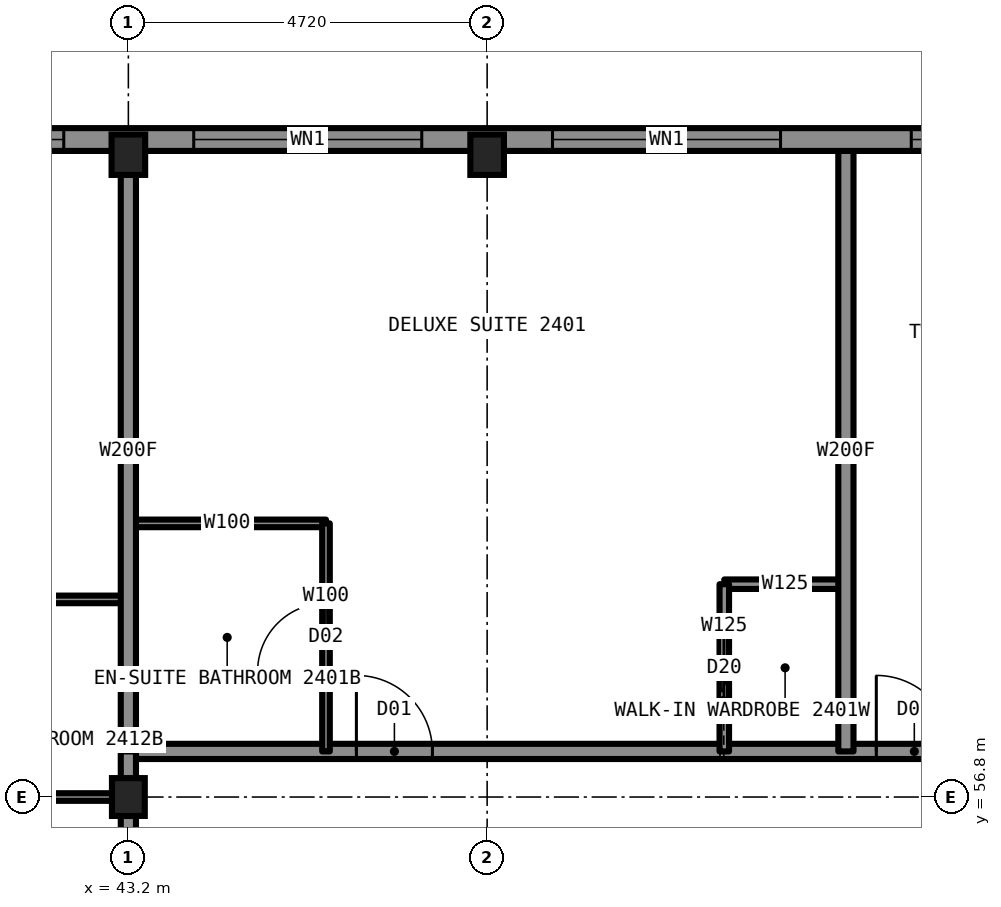
"""IFC4 building model, lengths in metres.
Left out: names, types, materials, properties, quantities, classifications, styles, units other than length and angle.
Written with IfcOpenShell. Run it as: python <this file> out.ifc"""

import sys

from ifc_helpers import new_model, si_unit, direction, frame, frame_2d, origin, origin_2d, place, context, subcontext, project, spatial, rectangle, i_section, extrude, element, fill, save


model = new_model("IFC4")
c1 = context("Model", 3, precision=1e-05, world=origin(), true_north=direction((0.0, 1.0)))
c2 = subcontext(c1, "Body", "Model", "MODEL_VIEW")
j1 = project(units=[si_unit("LENGTHUNIT", "METRE"), si_unit("PLANEANGLEUNIT", "RADIAN")], contexts=[c1])
p1 = place(None, origin())
s1 = spatial("IfcSite", under=j1, at=p1, CompositionType="ELEMENT")
p2 = place(p1, origin())
s2 = spatial("IfcBuilding", under=s1, at=p2, CompositionType="ELEMENT")
p3 = place(p2, frame((0.0, 0.0, 93.4)))
s3 = spatial("IfcBuildingStorey", under=s2, at=p3, CompositionType="ELEMENT", Elevation=93.4)
for number, where, z_axis, x_axis in (
    (1, (43.2, 65.25, 0.0), (0.0, 0.0, 1.0), (1.0, 0.0, 0.0)),
    (2, (47.92, 65.25, 0.0), (0.0, 0.0, 1.0), (1.0, 0.0, 0.0)),
):
    element("IfcColumn", number, at=place(p3, frame(where, z_axis=z_axis, x_axis=x_axis)), inside=s3, PredefinedType="COLUMN", context=c2, shape_type="SweptSolid", body=[
        extrude(i_section(OverallWidth=0.442, OverallDepth=0.531, WebThickness=0.066, FlangeThickness=0.106, at=origin_2d()), origin(), (0.0, 0.0, 1.0), 3.5),
    ])
p4 = place(p3, frame((43.2, 56.8, 0.0), z_axis=(0.0, 0.0, 1.0), x_axis=(1.0, 0.0, 0.0)))
e3 = element("IfcColumn", 3, at=p4, inside=s3, PredefinedType="COLUMN", context=c2, shape_type="SweptSolid", body=[
    extrude(i_section(OverallWidth=0.432, OverallDepth=0.498, WebThickness=0.056, FlangeThickness=0.089, at=origin_2d()), origin(), (0.0, 0.0, 1.0), 3.5),
])
p5 = place(p3, frame((40.6, 56.8, 0.0), z_axis=(0.0, 0.0, 1.0), x_axis=(1.0, 0.0, 0.0)))
e4 = element("IfcWall", 4, at=p5, inside=s3, PredefinedType="PARTITIONING", context=c2, shape_type="SweptSolid", body=[
    extrude(rectangle(XDim=2.6, YDim=0.1, at=frame_2d((1.3, 0.0))), origin(), (0.0, 0.0, 1.0), 2.573),
])
p6 = place(p3, frame((43.2, 57.4, 0.0), z_axis=(0.0, 0.0, 1.0), x_axis=(1.0, 0.0, 0.0)))
e5 = element("IfcWall", 5, at=p6, inside=s3, PredefinedType="PARTITIONING", context=c2, shape_type="SweptSolid", body=[
    extrude(rectangle(XDim=23.6, YDim=0.2, at=frame_2d((11.8, 0.0))), origin(), (0.0, 0.0, 1.0), 3.33),
])
p7 = place(p6, frame((3.0, 0.0, 0.0)))
e6 = element("IfcOpeningElement", 6, at=p7, cuts=e5, PredefinedType="OPENING", context=c2, shape_type="SweptSolid", body=[
    extrude(rectangle(XDim=1.0, YDim=2.2, at=frame_2d((0.5, 1.1))), frame((0.0, 0.11, 0.0), z_axis=(0.0, -1.0, 0.0), x_axis=(1.0, 0.0, 0.0)), (0.0, 0.0, 1.0), 0.22),
])
p8 = place(p6, frame((9.84, 0.0, 0.0)))
e7 = element("IfcOpeningElement", 7, at=p8, cuts=e5, PredefinedType="OPENING", context=c2, shape_type="SweptSolid", body=[
    extrude(rectangle(XDim=1.0, YDim=2.2, at=frame_2d((0.5, 1.1))), frame((0.0, 0.11, 0.0), z_axis=(0.0, -1.0, 0.0), x_axis=(1.0, 0.0, 0.0)), (0.0, 0.0, 1.0), 0.22),
])
p9 = place(p6, frame((16.71, 0.0, 0.0)))
e8 = element("IfcOpeningElement", 8, at=p9, cuts=e5, PredefinedType="OPENING", context=c2, shape_type="SweptSolid", body=[
    extrude(rectangle(XDim=1.0, YDim=2.2, at=frame_2d((0.5, 1.1))), frame((0.0, 0.11, 0.0), z_axis=(0.0, -1.0, 0.0), x_axis=(1.0, 0.0, 0.0)), (0.0, 0.0, 1.0), 0.22),
])
p10 = place(p6, frame((19.28, 0.0, 0.0)))
e9 = element("IfcOpeningElement", 9, at=p10, cuts=e5, PredefinedType="OPENING", context=c2, shape_type="SweptSolid", body=[
    extrude(rectangle(XDim=1.0, YDim=2.2, at=frame_2d((0.5, 1.1))), frame((0.0, 0.11, 0.0), z_axis=(0.0, -1.0, 0.0), x_axis=(1.0, 0.0, 0.0)), (0.0, 0.0, 1.0), 0.22),
])
p11 = place(p3, frame((40.6, 59.4, 0.0), z_axis=(0.0, 0.0, 1.0), x_axis=(1.0, 0.0, 0.0)))
e10 = element("IfcWall", 10, at=p11, inside=s3, PredefinedType="PARTITIONING", context=c2, shape_type="SweptSolid", body=[
    extrude(rectangle(XDim=2.6, YDim=0.1, at=frame_2d((1.3, 0.0))), origin(), (0.0, 0.0, 1.0), 3.33),
])
p12 = place(p3, frame((51.04, 59.6, 0.0), z_axis=(0.0, 0.0, 1.0), x_axis=(1.0, 0.0, 0.0)))
e11 = element("IfcWall", 11, at=p12, inside=s3, PredefinedType="PARTITIONING", context=c2, shape_type="SweptSolid", body=[
    extrude(rectangle(XDim=1.6, YDim=0.125, at=frame_2d((0.8, 0.0))), origin(), (0.0, 0.0, 1.0), 3.33),
])
p13 = place(p3, frame((43.2, 60.4, 0.0), z_axis=(0.0, 0.0, 1.0), x_axis=(1.0, 0.0, 0.0)))
e12 = element("IfcWall", 12, at=p13, inside=s3, PredefinedType="PARTITIONING", context=c2, shape_type="SweptSolid", body=[
    extrude(rectangle(XDim=2.6, YDim=0.1, at=frame_2d((1.3, 0.0))), origin(), (0.0, 0.0, 1.0), 3.33),
])
p14 = place(p3, frame((43.2, 33.22, 0.0), z_axis=(0.0, 0.0, 1.0), x_axis=(0.0, 1.0, 0.0)))
e13 = element("IfcWall", 13, at=p14, inside=s3, PredefinedType="PARTITIONING", context=c2, shape_type="SweptSolid", body=[
    extrude(rectangle(XDim=23.56, YDim=0.2, at=frame_2d((11.78, 0.0))), origin(), (0.0, 0.0, 1.0), 3.33),
])
p15 = place(p14, frame((16.4, 0.0, 0.0)))
e14 = element("IfcOpeningElement", 14, at=p15, cuts=e13, PredefinedType="OPENING", context=c2, shape_type="SweptSolid", body=[
    extrude(rectangle(XDim=1.0, YDim=2.2, at=frame_2d((0.5, 1.1))), frame((0.0, 0.11, 0.0), z_axis=(0.0, -1.0, 0.0), x_axis=(1.0, 0.0, 0.0)), (0.0, 0.0, 1.0), 0.22),
])
p16 = place(p14, frame((21.83, 0.0, 0.0)))
e15 = element("IfcOpeningElement", 15, at=p16, cuts=e13, PredefinedType="OPENING", context=c2, shape_type="SweptSolid", body=[
    extrude(rectangle(XDim=1.1, YDim=2.2, at=frame_2d((0.55, 1.1))), frame((0.0, 0.11, 0.0), z_axis=(0.0, -1.0, 0.0), x_axis=(1.0, 0.0, 0.0)), (0.0, 0.0, 1.0), 0.22),
])
p17 = place(p14, frame((0.63, 0.0, 0.0)))
e16 = element("IfcOpeningElement", 16, at=p17, cuts=e13, PredefinedType="OPENING", context=c2, shape_type="SweptSolid", body=[
    extrude(rectangle(XDim=1.1, YDim=2.2, at=frame_2d((0.55, 1.1))), frame((0.0, 0.11, 0.0), z_axis=(0.0, -1.0, 0.0), x_axis=(1.0, 0.0, 0.0)), (0.0, 0.0, 1.0), 0.22),
])
p18 = place(p14, frame((7.45, 0.0, 0.0)))
e17 = element("IfcOpeningElement", 17, at=p18, cuts=e13, PredefinedType="OPENING", context=c2, shape_type="SweptSolid", body=[
    extrude(rectangle(XDim=2.0, YDim=2.4, at=frame_2d((1.0, 1.2))), frame((0.0, 0.11, 0.0), z_axis=(0.0, -1.0, 0.0), x_axis=(1.0, 0.0, 0.0)), (0.0, 0.0, 1.0), 0.22),
])
p19 = place(p14, frame((5.4, 0.0, 0.0)))
e18 = element("IfcOpeningElement", 18, at=p19, cuts=e13, PredefinedType="OPENING", context=c2, shape_type="SweptSolid", body=[
    extrude(rectangle(XDim=1.0, YDim=2.1, at=frame_2d((0.5, 1.05))), frame((0.0, 0.11, 0.0), z_axis=(0.0, -1.0, 0.0), x_axis=(1.0, 0.0, 0.0)), (0.0, 0.0, 1.0), 0.22),
])
p20 = place(p3, frame((43.2, 57.4, 0.0), z_axis=(0.0, 0.0, 1.0), x_axis=(0.0, 1.0, 0.0)))
e19 = element("IfcWall", 19, at=p20, inside=s3, PredefinedType="PARTITIONING", context=c2, shape_type="SweptSolid", body=[
    extrude(rectangle(XDim=7.9, YDim=0.2, at=frame_2d((3.95, 0.0))), origin(), (0.0, 0.0, 1.0), 2.573),
])
p21 = place(p3, frame((52.64, 57.4, 0.0), z_axis=(0.0, 0.0, 1.0), x_axis=(0.0, 1.0, 0.0)))
e20 = element("IfcWall", 20, at=p21, inside=s3, PredefinedType="PARTITIONING", context=c2, shape_type="SweptSolid", body=[
    extrude(rectangle(XDim=7.9, YDim=0.2, at=frame_2d((3.95, 0.0))), origin(), (0.0, 0.0, 1.0), 3.33),
])
p22 = place(p3, frame((51.04, 57.4, 0.0), z_axis=(0.0, 0.0, 1.0), x_axis=(0.0, 1.0, 0.0)))
e21 = element("IfcWall", 21, at=p22, inside=s3, PredefinedType="PARTITIONING", context=c2, shape_type="SweptSolid", body=[
    extrude(rectangle(XDim=2.2, YDim=0.125, at=frame_2d((1.1, 0.0))), origin(), (0.0, 0.0, 1.0), 3.33),
])
p23 = place(p22, frame((0.7, 0.0, 0.0)))
e22 = element("IfcOpeningElement", 22, at=p23, cuts=e21, PredefinedType="OPENING", context=c2, shape_type="SweptSolid", body=[
    extrude(rectangle(XDim=0.8, YDim=2.1, at=frame_2d((0.4, 1.05))), frame((0.0, 0.073, 0.0), z_axis=(0.0, -1.0, 0.0), x_axis=(1.0, 0.0, 0.0)), (0.0, 0.0, 1.0), 0.145),
])
p24 = place(p3, frame((45.8, 57.4, 0.0), z_axis=(0.0, 0.0, 1.0), x_axis=(0.0, 1.0, 0.0)))
e23 = element("IfcWall", 23, at=p24, inside=s3, PredefinedType="PARTITIONING", context=c2, shape_type="SweptSolid", body=[
    extrude(rectangle(XDim=3.0, YDim=0.1, at=frame_2d((1.5, 0.0))), origin(), (0.0, 0.0, 1.0), 3.33),
])
p25 = place(p24, frame((1.05, 0.0, 0.0)))
e24 = element("IfcOpeningElement", 24, at=p25, cuts=e23, PredefinedType="OPENING", context=c2, shape_type="SweptSolid", body=[
    extrude(rectangle(XDim=0.9, YDim=2.1, at=frame_2d((0.45, 1.05))), frame((0.0, 0.06, 0.0), z_axis=(0.0, -1.0, 0.0), x_axis=(1.0, 0.0, 0.0)), (0.0, 0.0, 1.0), 0.12),
])
p26 = place(p3, frame((70.1, 65.45, 0.0), z_axis=(0.0, 0.0, 1.0), x_axis=(-1.0, 0.0, 0.0)))
e25 = element("IfcWall", 25, at=p26, inside=s3, PredefinedType="SOLIDWALL", context=c2, shape_type="SweptSolid", body=[
    extrude(rectangle(XDim=30.2, YDim=0.3, at=frame_2d((15.1, 0.0))), origin(), (0.0, 0.0, 1.0), 2.83),
])
p27 = place(p26, frame((0.85, 0.0, 0.5)))
e26 = element("IfcOpeningElement", 26, at=p27, cuts=e25, PredefinedType="OPENING", context=c2, shape_type="SweptSolid", body=[
    extrude(rectangle(XDim=1.6, YDim=2.0, at=frame_2d((0.8, 1.0))), frame((0.0, 0.16, 0.0), z_axis=(0.0, -1.0, 0.0), x_axis=(1.0, 0.0, 0.0)), (0.0, 0.0, 1.0), 0.32),
])
p28 = place(p26, frame((4.16, 0.0, 0.5)))
e27 = element("IfcOpeningElement", 27, at=p28, cuts=e25, PredefinedType="OPENING", context=c2, shape_type="SweptSolid", body=[
    extrude(rectangle(XDim=3.0, YDim=2.0, at=frame_2d((1.5, 1.0))), frame((0.0, 0.16, 0.0), z_axis=(0.0, -1.0, 0.0), x_axis=(1.0, 0.0, 0.0)), (0.0, 0.0, 1.0), 0.32),
])
p29 = place(p26, frame((8.88, 0.0, 0.5)))
e28 = element("IfcOpeningElement", 28, at=p29, cuts=e25, PredefinedType="OPENING", context=c2, shape_type="SweptSolid", body=[
    extrude(rectangle(XDim=3.0, YDim=2.0, at=frame_2d((1.5, 1.0))), frame((0.0, 0.16, 0.0), z_axis=(0.0, -1.0, 0.0), x_axis=(1.0, 0.0, 0.0)), (0.0, 0.0, 1.0), 0.32),
])
p30 = place(p26, frame((13.6, 0.0, 0.5)))
e29 = element("IfcOpeningElement", 29, at=p30, cuts=e25, PredefinedType="OPENING", context=c2, shape_type="SweptSolid", body=[
    extrude(rectangle(XDim=3.0, YDim=2.0, at=frame_2d((1.5, 1.0))), frame((0.0, 0.16, 0.0), z_axis=(0.0, -1.0, 0.0), x_axis=(1.0, 0.0, 0.0)), (0.0, 0.0, 1.0), 0.32),
])
p31 = place(p26, frame((18.32, 0.0, 0.5)))
e30 = element("IfcOpeningElement", 30, at=p31, cuts=e25, PredefinedType="OPENING", context=c2, shape_type="SweptSolid", body=[
    extrude(rectangle(XDim=3.0, YDim=2.0, at=frame_2d((1.5, 1.0))), frame((0.0, 0.16, 0.0), z_axis=(0.0, -1.0, 0.0), x_axis=(1.0, 0.0, 0.0)), (0.0, 0.0, 1.0), 0.32),
])
p32 = place(p26, frame((23.04, 0.0, 0.5)))
e31 = element("IfcOpeningElement", 31, at=p32, cuts=e25, PredefinedType="OPENING", context=c2, shape_type="SweptSolid", body=[
    extrude(rectangle(XDim=3.0, YDim=2.0, at=frame_2d((1.5, 1.0))), frame((0.0, 0.16, 0.0), z_axis=(0.0, -1.0, 0.0), x_axis=(1.0, 0.0, 0.0)), (0.0, 0.0, 1.0), 0.32),
])
p33 = place(p26, frame((27.75, 0.0, 0.5)))
e32 = element("IfcOpeningElement", 32, at=p33, cuts=e25, PredefinedType="OPENING", context=c2, shape_type="SweptSolid", body=[
    extrude(rectangle(XDim=1.6, YDim=2.0, at=frame_2d((0.8, 1.0))), frame((0.0, 0.16, 0.0), z_axis=(0.0, -1.0, 0.0), x_axis=(1.0, 0.0, 0.0)), (0.0, 0.0, 1.0), 0.32),
])
p34 = place(p3, frame((43.2, 56.78, 0.0), z_axis=(0.0, 0.0, 1.0), x_axis=(0.0, 1.0, 0.0)))
e33 = element("IfcWall", 33, at=p34, inside=s3, PredefinedType="PARTITIONING", context=c2, shape_type="SweptSolid", body=[
    extrude(rectangle(XDim=0.62, YDim=0.2, at=frame_2d((0.31, 0.0))), origin(), (0.0, 0.0, 1.0), 2.573),
])
p35 = place(p7, origin())
e34 = element("IfcDoor", 34, at=p35, inside=s3, OperationType="SINGLE_SWING_LEFT", PredefinedType="DOOR", context=c2, shape_type="SweptSolid", body=[
    extrude(rectangle(XDim=1.0, YDim=2.2, at=frame_2d((0.5, 1.1))), frame((0.0, 0.025, 0.0), z_axis=(0.0, -1.0, 0.0), x_axis=(1.0, 0.0, 0.0)), (0.0, 0.0, 1.0), 0.05),
])
fill(e6, e34)
p36 = place(p25, origin())
e35 = element("IfcDoor", 35, at=p36, inside=s3, OperationType="SINGLE_SWING_RIGHT", PredefinedType="DOOR", context=c2, shape_type="SweptSolid", body=[
    extrude(rectangle(XDim=0.9, YDim=2.1, at=frame_2d((0.45, 1.05))), frame((0.0, 0.025, 0.0), z_axis=(0.0, -1.0, 0.0), x_axis=(1.0, 0.0, 0.0)), (0.0, 0.0, 1.0), 0.05),
])
fill(e24, e35)
p37 = place(p23, origin())
e36 = element("IfcDoor", 36, at=p37, inside=s3, OperationType="SLIDING_TO_LEFT", PredefinedType="DOOR", context=c2, shape_type="SweptSolid", body=[
    extrude(rectangle(XDim=0.8, YDim=2.1, at=frame_2d((0.4, 1.05))), frame((0.0, 0.025, 0.0), z_axis=(0.0, -1.0, 0.0), x_axis=(1.0, 0.0, 0.0)), (0.0, 0.0, 1.0), 0.05),
])
fill(e22, e36)
p38 = place(p8, origin())
e37 = element("IfcDoor", 37, at=p38, inside=s3, OperationType="SINGLE_SWING_LEFT", PredefinedType="DOOR", context=c2, shape_type="SweptSolid", body=[
    extrude(rectangle(XDim=1.0, YDim=2.2, at=frame_2d((0.5, 1.1))), frame((0.0, 0.025, 0.0), z_axis=(0.0, -1.0, 0.0), x_axis=(1.0, 0.0, 0.0)), (0.0, 0.0, 1.0), 0.05),
])
fill(e7, e37)
p39 = place(p30, origin())
e38 = element("IfcWindow", 38, at=p39, inside=s3, PartitioningType="SINGLE_PANEL", PredefinedType="WINDOW", context=c2, shape_type="SweptSolid", body=[
    extrude(rectangle(XDim=3.0, YDim=2.0, at=frame_2d((1.5, 1.0))), frame((0.0, 0.03, 0.0), z_axis=(0.0, -1.0, 0.0), x_axis=(1.0, 0.0, 0.0)), (0.0, 0.0, 1.0), 0.06),
])
fill(e29, e38)
p40 = place(p31, origin())
e39 = element("IfcWindow", 39, at=p40, inside=s3, PartitioningType="SINGLE_PANEL", PredefinedType="WINDOW", context=c2, shape_type="SweptSolid", body=[
    extrude(rectangle(XDim=3.0, YDim=2.0, at=frame_2d((1.5, 1.0))), frame((0.0, 0.03, 0.0), z_axis=(0.0, -1.0, 0.0), x_axis=(1.0, 0.0, 0.0)), (0.0, 0.0, 1.0), 0.06),
])
fill(e30, e39)
p41 = place(p32, origin())
e40 = element("IfcWindow", 40, at=p41, inside=s3, PartitioningType="SINGLE_PANEL", PredefinedType="WINDOW", context=c2, shape_type="SweptSolid", body=[
    extrude(rectangle(XDim=3.0, YDim=2.0, at=frame_2d((1.5, 1.0))), frame((0.0, 0.03, 0.0), z_axis=(0.0, -1.0, 0.0), x_axis=(1.0, 0.0, 0.0)), (0.0, 0.0, 1.0), 0.06),
])
fill(e31, e40)
p42 = place(p33, origin())
e41 = element("IfcWindow", 41, at=p42, inside=s3, PartitioningType="SINGLE_PANEL", PredefinedType="WINDOW", context=c2, shape_type="SweptSolid", body=[
    extrude(rectangle(XDim=1.6, YDim=2.0, at=frame_2d((0.8, 1.0))), frame((0.0, 0.03, 0.0), z_axis=(0.0, -1.0, 0.0), x_axis=(1.0, 0.0, 0.0)), (0.0, 0.0, 1.0), 0.06),
])
fill(e32, e41)
save(model, sys.argv[1])
